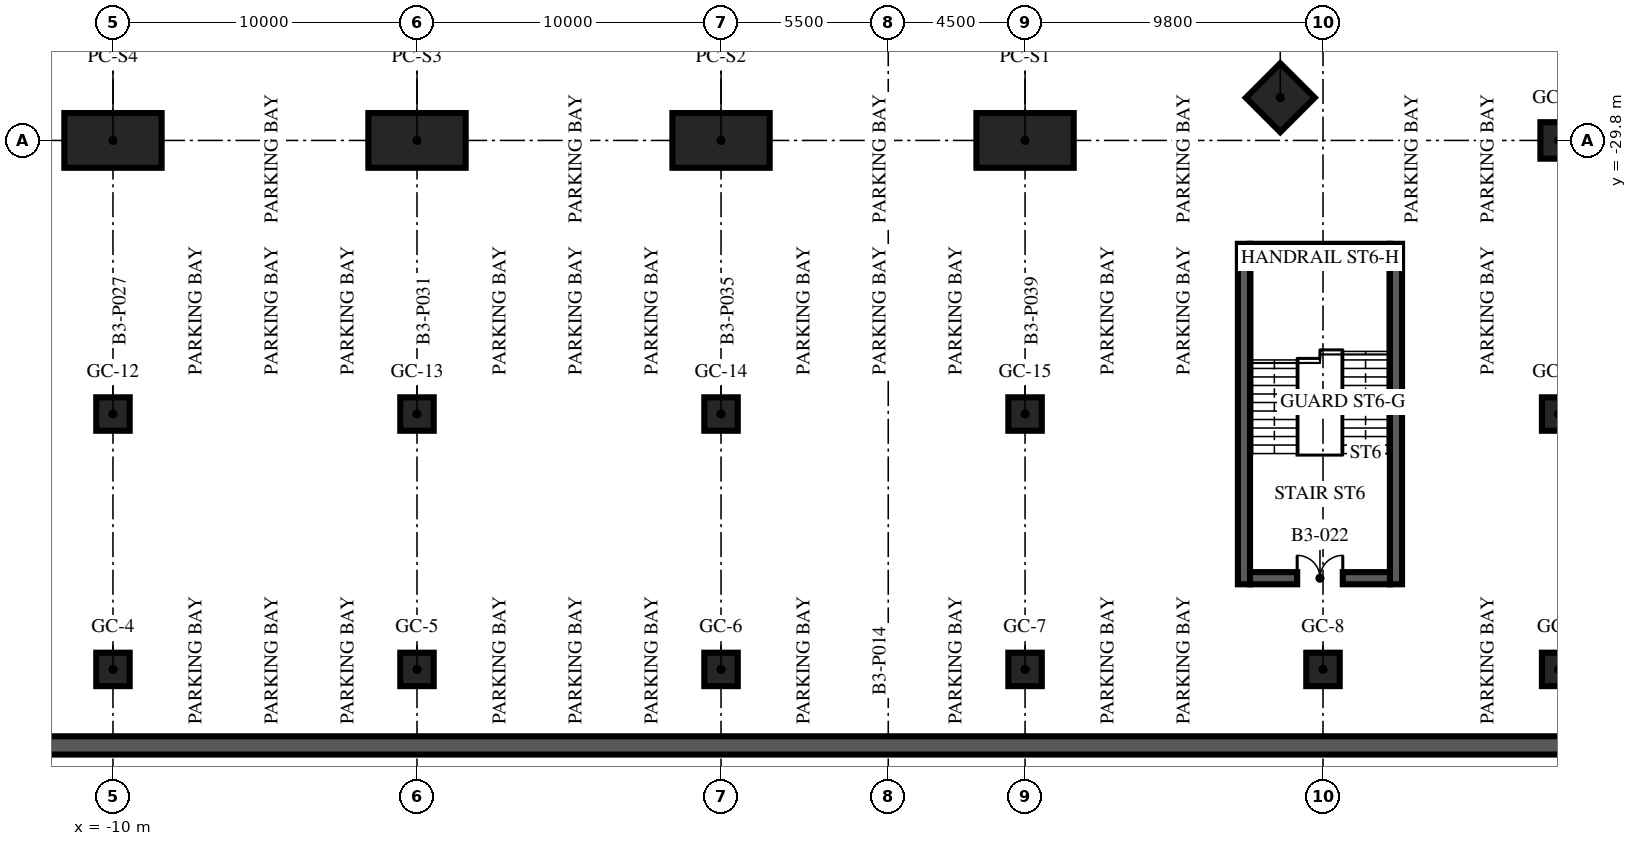
"""IFC4 building model, lengths in metres.
Left out: names, types, materials, properties, quantities, classifications, styles, units other than length and angle.
Written with IfcOpenShell. Run it as: python <this file> out.ifc"""

import sys

from ifc_helpers import new_model, si_unit, direction, frame, frame_2d, origin, origin_2d, place, context, subcontext, project, spatial, rectangle, hollow_rectangle, extrude, element, fill, save


model = new_model("IFC4")
c1 = context("Model", 3, precision=1e-05, world=origin(), true_north=direction((0.0, 1.0)))
c2 = subcontext(c1, "Body", "Model", "MODEL_VIEW")
j1 = project(units=[si_unit("LENGTHUNIT", "METRE"), si_unit("PLANEANGLEUNIT", "RADIAN")], contexts=[c1])
p1 = place(None, origin())
s1 = spatial("IfcSite", under=j1, at=p1, CompositionType="ELEMENT")
p2 = place(p1, origin())
s2 = spatial("IfcBuilding", under=s1, at=p2, CompositionType="ELEMENT")
p3 = place(p2, frame((0.0, 0.0, -13.2)))
s3 = spatial("IfcBuildingStorey", under=s2, at=p3, CompositionType="ELEMENT", Elevation=-13.2)
p4 = place(p3, frame((-46.0, -49.7, -0.4), z_axis=(0.0, 0.0, 1.0), x_axis=(1.0, 0.0, 0.0)))
e1 = element("IfcWall", 1, at=p4, inside=s3, PredefinedType="SOLIDWALL", context=c2, shape_type="SweptSolid", body=[
    extrude(rectangle(XDim=92.0, YDim=0.6, at=frame_2d((46.0, 0.0))), origin(), (0.0, 0.0, 1.0), 4.3),
])
for number, where, z_axis, x_axis in (
    (2, (20.0, -29.8, -0.4), (0.0, 0.0, 1.0), (1.0, 0.0, 0.0)),
    (3, (10.0, -29.8, -0.4), (0.0, 0.0, 1.0), (1.0, 0.0, 0.0)),
    (4, (0.0, -29.8, -0.4), (0.0, 0.0, 1.0), (1.0, 0.0, 0.0)),
    (5, (-10.0, -29.8, -0.4), (0.0, 0.0, 1.0), (1.0, 0.0, 0.0)),
):
    element("IfcColumn", number, at=place(p3, frame(where, z_axis=z_axis, x_axis=x_axis)), inside=s3, PredefinedType="COLUMN", context=c2, shape_type="SweptSolid", body=[
        extrude(hollow_rectangle(XDim=3.2, YDim=1.8, WallThickness=0.2, at=origin_2d()), origin(), (0.0, 0.0, 1.0), 4.6),
    ])
p5 = place(p3, frame((28.394, -28.394, -0.4), z_axis=(0.0, 0.0, 1.0), x_axis=(0.707106781187, 0.707106781187, 0.0)))
e6 = element("IfcColumn", 6, at=p5, inside=s3, PredefinedType="COLUMN", context=c2, shape_type="SweptSolid", body=[
    extrude(hollow_rectangle(XDim=1.6, YDim=1.6, WallThickness=0.1, at=origin_2d()), origin(), (0.0, 0.0, 1.0), 4.6),
])
for number, where, z_axis, x_axis in (
    (7, (-10.0, -47.2, -0.4), (0.0, 0.0, 1.0), (1.0, 0.0, 0.0)),
    (8, (0.0, -47.2, -0.4), (0.0, 0.0, 1.0), (1.0, 0.0, 0.0)),
    (9, (10.0, -47.2, -0.4), (0.0, 0.0, 1.0), (1.0, 0.0, 0.0)),
    (10, (20.0, -47.2, -0.4), (0.0, 0.0, 1.0), (1.0, 0.0, 0.0)),
    (11, (29.8, -47.2, -0.4), (0.0, 0.0, 1.0), (1.0, 0.0, 0.0)),
    (12, (37.55, -47.2, -0.4), (0.0, 0.0, 1.0), (1.0, 0.0, 0.0)),
    (13, (-10.0, -38.8, -0.4), (0.0, 0.0, 1.0), (1.0, 0.0, 0.0)),
    (14, (0.0, -38.8, -0.4), (0.0, 0.0, 1.0), (1.0, 0.0, 0.0)),
    (15, (10.0, -38.8, -0.4), (0.0, 0.0, 1.0), (1.0, 0.0, 0.0)),
    (16, (20.0, -38.8, -0.4), (0.0, 0.0, 1.0), (1.0, 0.0, 0.0)),
    (17, (37.55, -38.8, -0.4), (0.0, 0.0, 1.0), (1.0, 0.0, 0.0)),
):
    element("IfcColumn", number, at=place(p3, frame(where, z_axis=z_axis, x_axis=x_axis)), inside=s3, PredefinedType="COLUMN", context=c2, shape_type="SweptSolid", body=[
        extrude(rectangle(XDim=1.1, YDim=1.1, at=origin_2d()), origin(), (0.0, 0.0, 1.0), 4.6),
    ])
p6 = place(p3, frame((37.55, -29.8, -0.4), z_axis=(0.0, 0.0, 1.0), x_axis=(1.0, 0.0, 0.0)))
e18 = element("IfcColumn", 18, at=p6, inside=s3, PredefinedType="COLUMN", context=c2, shape_type="SweptSolid", body=[
    extrude(rectangle(XDim=1.2, YDim=1.2, at=origin_2d()), origin(), (0.0, 0.0, 1.0), 4.6),
])
for number, where, z_axis, x_axis in (
    (19, (27.2, -44.4, 0.0), (0.0, 0.0, 1.0), (0.0, 1.0, 0.0)),
    (20, (32.2, -44.4, 0.0), (0.0, 0.0, 1.0), (0.0, 1.0, 0.0)),
):
    element("IfcWall", number, at=place(p3, frame(where, z_axis=z_axis, x_axis=x_axis)), inside=s3, PredefinedType="SOLIDWALL", context=c2, shape_type="SweptSolid", body=[
        extrude(rectangle(XDim=11.2, YDim=0.4, at=frame_2d((5.6, 0.0))), origin(), (0.0, 0.0, 1.0), 3.9),
    ])
p7 = place(p3, frame((27.4, -44.2, 0.0), z_axis=(0.0, 0.0, 1.0), x_axis=(1.0, 0.0, 0.0)))
e21 = element("IfcWall", 21, at=p7, inside=s3, PredefinedType="SOLIDWALL", context=c2, shape_type="SweptSolid", body=[
    extrude(rectangle(XDim=4.6, YDim=0.4, at=frame_2d((2.3, 0.0))), origin(), (0.0, 0.0, 1.0), 3.9),
])
p8 = place(p7, frame((1.55, 0.0, 0.0)))
e22 = element("IfcOpeningElement", 22, at=p8, cuts=e21, PredefinedType="OPENING", context=c2, shape_type="SweptSolid", body=[
    extrude(rectangle(XDim=1.5, YDim=2.1, at=frame_2d((0.75, 1.05))), frame((0.0, 0.21, 0.0), z_axis=(0.0, -1.0, 0.0), x_axis=(1.0, 0.0, 0.0)), (0.0, 0.0, 1.0), 0.42),
])
p9 = place(p3, frame((27.4, -33.4, 0.0), z_axis=(0.0, 0.0, 1.0), x_axis=(1.0, 0.0, 0.0)))
e23 = element("IfcWall", 23, at=p9, inside=s3, PredefinedType="SOLIDWALL", context=c2, shape_type="SweptSolid", body=[
    extrude(rectangle(XDim=4.6, YDim=0.4, at=frame_2d((2.3, 0.0))), origin(), (0.0, 0.0, 1.0), 3.9),
])
p10 = place(p8, origin())
e24 = element("IfcDoor", 24, at=p10, inside=s3, OperationType="DOUBLE_DOOR_SINGLE_SWING", PredefinedType="DOOR", context=c2, shape_type="SweptSolid", body=[
    extrude(rectangle(XDim=1.5, YDim=2.1, at=frame_2d((0.75, 1.05))), frame((0.0, 0.025, 0.0), z_axis=(0.0, -1.0, 0.0), x_axis=(1.0, 0.0, 0.0)), (0.0, 0.0, 1.0), 0.05),
])
fill(e22, e24)
save(model, sys.argv[1])
